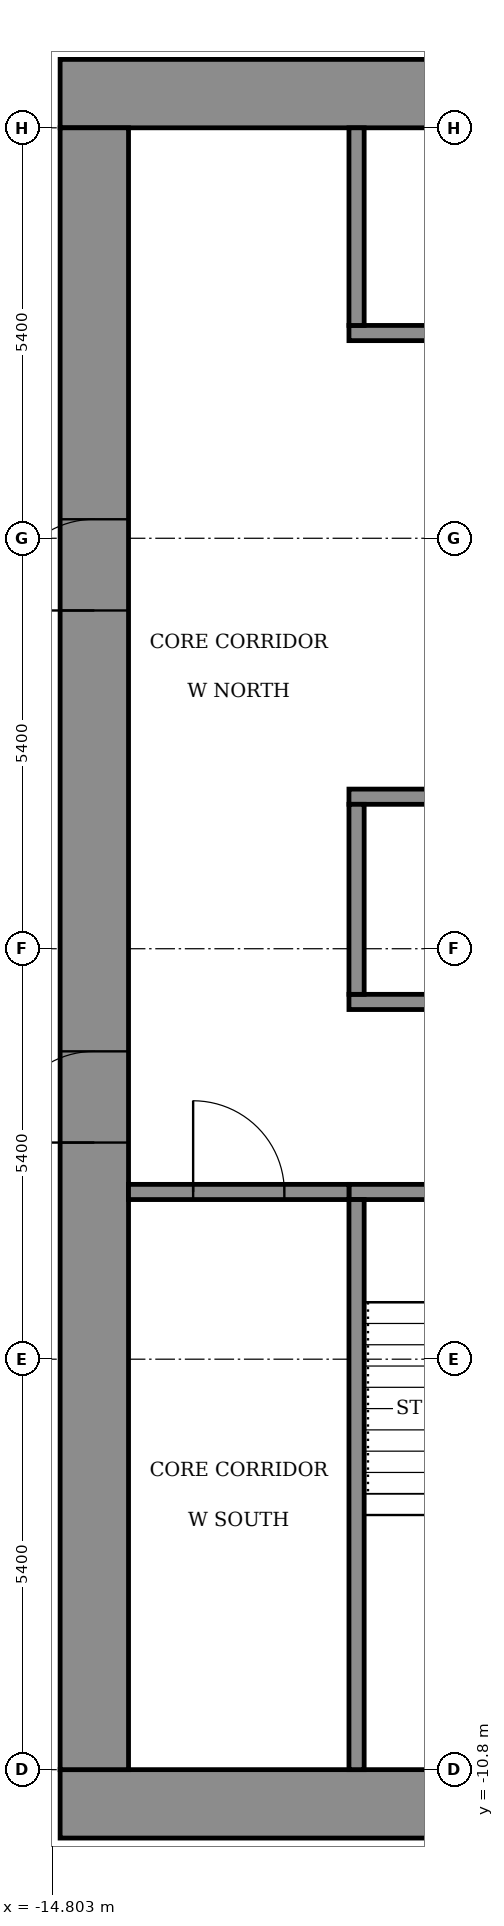
"""IFC4 building model, lengths in metres.
Left out: names, types, materials, properties, quantities, classifications, styles, units other than length and angle.
Written with IfcOpenShell. Run it as: python <this file> out.ifc"""

import sys

from ifc_helpers import new_model, si_unit, direction, frame, frame_2d, origin, place, context, subcontext, project, spatial, rectangle, extrude, element, fill, save


model = new_model("IFC4")
c1 = context("Model", 3, precision=1e-05, world=origin(), true_north=direction((0.0, 1.0)))
c2 = subcontext(c1, "Body", "Model", "MODEL_VIEW")
j1 = project(units=[si_unit("LENGTHUNIT", "METRE"), si_unit("PLANEANGLEUNIT", "RADIAN")], contexts=[c1])
p1 = place(None, origin())
s1 = spatial("IfcSite", under=j1, at=p1, CompositionType="ELEMENT")
p2 = place(p1, origin())
s2 = spatial("IfcBuilding", under=s1, at=p2, CompositionType="ELEMENT")
p3 = place(p2, frame((0.0, 0.0, 152.7)))
s3 = spatial("IfcBuildingStorey", under=s2, at=p3, CompositionType="ELEMENT", Elevation=152.7)
for number, where, z_axis, x_axis in (
    (1, (-14.7, -11.25, 0.0), (0.0, 0.0, 1.0), (1.0, 0.0, 0.0)),
    (2, (-14.7, 11.25, 0.0), (0.0, 0.0, 1.0), (1.0, 0.0, 0.0)),
):
    element("IfcWall", number, at=place(p3, frame(where, z_axis=z_axis, x_axis=x_axis)), inside=s3, PredefinedType="SHEAR", context=c2, shape_type="SweptSolid", body=[
        extrude(rectangle(XDim=29.4, YDim=0.9, at=frame_2d((14.7, 0.0))), origin(), (0.0, 0.0, 1.0), 3.6),
    ])
p4 = place(p3, frame((-14.25, -10.8, 0.0), z_axis=(0.0, 0.0, 1.0), x_axis=(0.0, 1.0, 0.0)))
e3 = element("IfcWall", 3, at=p4, inside=s3, PredefinedType="SHEAR", context=c2, shape_type="SweptSolid", body=[
    extrude(rectangle(XDim=21.6, YDim=0.9, at=frame_2d((10.8, 0.0))), origin(), (0.0, 0.0, 1.0), 3.6),
])
p5 = place(p4, frame((8.25, 0.0, 0.0)))
e4 = element("IfcOpeningElement", 4, at=p5, cuts=e3, PredefinedType="OPENING", context=c2, shape_type="SweptSolid", body=[
    extrude(rectangle(XDim=1.2, YDim=2.1, at=frame_2d((0.6, 1.05))), frame((0.0, 0.46, 0.0), z_axis=(0.0, -1.0, 0.0), x_axis=(1.0, 0.0, 0.0)), (0.0, 0.0, 1.0), 0.92),
])
p6 = place(p4, frame((15.25, 0.0, 0.0)))
e5 = element("IfcOpeningElement", 5, at=p6, cuts=e3, PredefinedType="OPENING", context=c2, shape_type="SweptSolid", body=[
    extrude(rectangle(XDim=1.2, YDim=2.1, at=frame_2d((0.6, 1.05))), frame((0.0, 0.46, 0.0), z_axis=(0.0, -1.0, 0.0), x_axis=(1.0, 0.0, 0.0)), (0.0, 0.0, 1.0), 0.92),
])
p7 = place(p3, frame((-10.9, -3.2, 0.0), z_axis=(0.0, 0.0, 1.0), x_axis=(1.0, 0.0, 0.0)))
e6 = element("IfcWall", 6, at=p7, inside=s3, PredefinedType="SHEAR", context=c2, shape_type="SweptSolid", body=[
    extrude(rectangle(XDim=21.8, YDim=0.2, at=frame_2d((10.9, 0.0))), origin(), (0.0, 0.0, 1.0), 3.05),
])
p8 = place(p7, frame((1.075, 0.0, 0.0)))
e7 = element("IfcOpeningElement", 7, at=p8, cuts=e6, PredefinedType="OPENING", context=c2, shape_type="SweptSolid", body=[
    extrude(rectangle(XDim=1.1, YDim=2.1, at=frame_2d((0.55, 1.05))), frame((0.0, 0.11, 0.0), z_axis=(0.0, -1.0, 0.0), x_axis=(1.0, 0.0, 0.0)), (0.0, 0.0, 1.0), 0.22),
])
p9 = place(p7, frame((10.325, 0.0, 0.0)))
e8 = element("IfcOpeningElement", 8, at=p9, cuts=e6, PredefinedType="OPENING", context=c2, shape_type="SweptSolid", body=[
    extrude(rectangle(XDim=1.1, YDim=2.1, at=frame_2d((0.55, 1.05))), frame((0.0, 0.11, 0.0), z_axis=(0.0, -1.0, 0.0), x_axis=(1.0, 0.0, 0.0)), (0.0, 0.0, 1.0), 0.22),
])
p10 = place(p7, frame((19.625, 0.0, 0.0)))
e9 = element("IfcOpeningElement", 9, at=p10, cuts=e6, PredefinedType="OPENING", context=c2, shape_type="SweptSolid", body=[
    extrude(rectangle(XDim=1.1, YDim=2.1, at=frame_2d((0.55, 1.05))), frame((0.0, 0.11, 0.0), z_axis=(0.0, -1.0, 0.0), x_axis=(1.0, 0.0, 0.0)), (0.0, 0.0, 1.0), 0.22),
])
p11 = place(p7, frame((5.7, 0.0, 0.0)))
e10 = element("IfcOpeningElement", 10, at=p11, cuts=e6, PredefinedType="OPENING", context=c2, shape_type="SweptSolid", body=[
    extrude(rectangle(XDim=1.1, YDim=2.1, at=frame_2d((0.55, 1.05))), frame((0.0, 0.11, 0.0), z_axis=(0.0, -1.0, 0.0), x_axis=(1.0, 0.0, 0.0)), (0.0, 0.0, 1.0), 0.22),
])
p12 = place(p7, frame((14.975, 0.0, 0.0)))
e11 = element("IfcOpeningElement", 11, at=p12, cuts=e6, PredefinedType="OPENING", context=c2, shape_type="SweptSolid", body=[
    extrude(rectangle(XDim=1.1, YDim=2.1, at=frame_2d((0.55, 1.05))), frame((0.0, 0.11, 0.0), z_axis=(0.0, -1.0, 0.0), x_axis=(1.0, 0.0, 0.0)), (0.0, 0.0, 1.0), 0.22),
])
p13 = place(p3, frame((-10.9, -0.7, 0.0), z_axis=(0.0, 0.0, 1.0), x_axis=(1.0, 0.0, 0.0)))
e12 = element("IfcWall", 12, at=p13, inside=s3, PredefinedType="SHEAR", context=c2, shape_type="SweptSolid", body=[
    extrude(rectangle(XDim=21.8, YDim=0.2, at=frame_2d((10.9, 0.0))), origin(), (0.0, 0.0, 1.0), 3.05),
])
p14 = place(p3, frame((-10.9, 2.0, 0.0), z_axis=(0.0, 0.0, 1.0), x_axis=(1.0, 0.0, 0.0)))
e13 = element("IfcWall", 13, at=p14, inside=s3, PredefinedType="SHEAR", context=c2, shape_type="SweptSolid", body=[
    extrude(rectangle(XDim=21.8, YDim=0.2, at=frame_2d((10.9, 0.0))), origin(), (0.0, 0.0, 1.0), 3.05),
])
p15 = place(p14, frame((14.4, 0.0, 0.0)))
e14 = element("IfcOpeningElement", 14, at=p15, cuts=e13, PredefinedType="OPENING", context=c2, shape_type="SweptSolid", body=[
    extrude(rectangle(XDim=1.1, YDim=2.1, at=frame_2d((0.55, 1.05))), frame((0.0, 0.11, 0.0), z_axis=(0.0, -1.0, 0.0), x_axis=(1.0, 0.0, 0.0)), (0.0, 0.0, 1.0), 0.22),
])
p16 = place(p14, frame((17.1, 0.0, 0.0)))
e15 = element("IfcOpeningElement", 15, at=p16, cuts=e13, PredefinedType="OPENING", context=c2, shape_type="SweptSolid", body=[
    extrude(rectangle(XDim=1.1, YDim=2.1, at=frame_2d((0.55, 1.05))), frame((0.0, 0.11, 0.0), z_axis=(0.0, -1.0, 0.0), x_axis=(1.0, 0.0, 0.0)), (0.0, 0.0, 1.0), 0.22),
])
p17 = place(p14, frame((19.8, 0.0, 0.0)))
e16 = element("IfcOpeningElement", 16, at=p17, cuts=e13, PredefinedType="OPENING", context=c2, shape_type="SweptSolid", body=[
    extrude(rectangle(XDim=1.1, YDim=2.1, at=frame_2d((0.55, 1.05))), frame((0.0, 0.11, 0.0), z_axis=(0.0, -1.0, 0.0), x_axis=(1.0, 0.0, 0.0)), (0.0, 0.0, 1.0), 0.22),
])
p18 = place(p14, frame((3.025, 0.0, 0.0)))
e17 = element("IfcOpeningElement", 17, at=p18, cuts=e13, PredefinedType="OPENING", context=c2, shape_type="SweptSolid", body=[
    extrude(rectangle(XDim=0.9, YDim=2.1, at=frame_2d((0.45, 1.05))), frame((0.0, 0.11, 0.0), z_axis=(0.0, -1.0, 0.0), x_axis=(1.0, 0.0, 0.0)), (0.0, 0.0, 1.0), 0.22),
])
p19 = place(p14, frame((9.775, 0.0, 0.0)))
e18 = element("IfcOpeningElement", 18, at=p19, cuts=e13, PredefinedType="OPENING", context=c2, shape_type="SweptSolid", body=[
    extrude(rectangle(XDim=0.9, YDim=2.1, at=frame_2d((0.45, 1.05))), frame((0.0, 0.11, 0.0), z_axis=(0.0, -1.0, 0.0), x_axis=(1.0, 0.0, 0.0)), (0.0, 0.0, 1.0), 0.22),
])
p20 = place(p3, frame((-10.9, 8.1, 0.0), z_axis=(0.0, 0.0, 1.0), x_axis=(1.0, 0.0, 0.0)))
e19 = element("IfcWall", 19, at=p20, inside=s3, PredefinedType="SHEAR", context=c2, shape_type="SweptSolid", body=[
    extrude(rectangle(XDim=21.8, YDim=0.2, at=frame_2d((10.9, 0.0))), origin(), (0.0, 0.0, 1.0), 3.05),
])
p21 = place(p20, frame((14.4, 0.0, 0.0)))
e20 = element("IfcOpeningElement", 20, at=p21, cuts=e19, PredefinedType="OPENING", context=c2, shape_type="SweptSolid", body=[
    extrude(rectangle(XDim=1.1, YDim=2.1, at=frame_2d((0.55, 1.05))), frame((0.0, 0.11, 0.0), z_axis=(0.0, -1.0, 0.0), x_axis=(1.0, 0.0, 0.0)), (0.0, 0.0, 1.0), 0.22),
])
p22 = place(p20, frame((17.1, 0.0, 0.0)))
e21 = element("IfcOpeningElement", 21, at=p22, cuts=e19, PredefinedType="OPENING", context=c2, shape_type="SweptSolid", body=[
    extrude(rectangle(XDim=1.1, YDim=2.1, at=frame_2d((0.55, 1.05))), frame((0.0, 0.11, 0.0), z_axis=(0.0, -1.0, 0.0), x_axis=(1.0, 0.0, 0.0)), (0.0, 0.0, 1.0), 0.22),
])
p23 = place(p20, frame((19.8, 0.0, 0.0)))
e22 = element("IfcOpeningElement", 22, at=p23, cuts=e19, PredefinedType="OPENING", context=c2, shape_type="SweptSolid", body=[
    extrude(rectangle(XDim=1.1, YDim=2.1, at=frame_2d((0.55, 1.05))), frame((0.0, 0.11, 0.0), z_axis=(0.0, -1.0, 0.0), x_axis=(1.0, 0.0, 0.0)), (0.0, 0.0, 1.0), 0.22),
])
p24 = place(p20, frame((6.4, 0.0, 0.0)))
e23 = element("IfcOpeningElement", 23, at=p24, cuts=e19, PredefinedType="OPENING", context=c2, shape_type="SweptSolid", body=[
    extrude(rectangle(XDim=0.9, YDim=2.1, at=frame_2d((0.45, 1.05))), frame((0.0, 0.11, 0.0), z_axis=(0.0, -1.0, 0.0), x_axis=(1.0, 0.0, 0.0)), (0.0, 0.0, 1.0), 0.22),
])
p25 = place(p3, frame((-10.8, -10.8, 0.0), z_axis=(0.0, 0.0, 1.0), x_axis=(0.0, 1.0, 0.0)))
e24 = element("IfcWall", 24, at=p25, inside=s3, PredefinedType="SHEAR", context=c2, shape_type="SweptSolid", body=[
    extrude(rectangle(XDim=7.5, YDim=0.2, at=frame_2d((3.75, 0.0))), origin(), (0.0, 0.0, 1.0), 3.05),
])
p26 = place(p3, frame((-10.8, -0.6, 0.0), z_axis=(0.0, 0.0, 1.0), x_axis=(0.0, 1.0, 0.0)))
e25 = element("IfcWall", 25, at=p26, inside=s3, PredefinedType="STANDARD", context=c2, shape_type="SweptSolid", body=[
    extrude(rectangle(XDim=2.5, YDim=0.2, at=frame_2d((1.25, 0.0))), origin(), (0.0, 0.0, 1.0), 3.05),
])
p27 = place(p3, frame((-10.8, 8.2, 0.0), z_axis=(0.0, 0.0, 1.0), x_axis=(0.0, 1.0, 0.0)))
e26 = element("IfcWall", 26, at=p27, inside=s3, PredefinedType="STANDARD", context=c2, shape_type="SweptSolid", body=[
    extrude(rectangle(XDim=2.6, YDim=0.2, at=frame_2d((1.3, 0.0))), origin(), (0.0, 0.0, 1.0), 3.05),
])
p28 = place(p3, frame((-13.8, -3.2, 0.0), z_axis=(0.0, 0.0, 1.0), x_axis=(1.0, 0.0, 0.0)))
e27 = element("IfcWall", 27, at=p28, inside=s3, PredefinedType="STANDARD", context=c2, shape_type="SweptSolid", body=[
    extrude(rectangle(XDim=2.9, YDim=0.2, at=frame_2d((1.45, 0.0))), origin(), (0.0, 0.0, 1.0), 3.05),
])
p29 = place(p28, frame((0.85, 0.0, 0.0)))
e28 = element("IfcOpeningElement", 28, at=p29, cuts=e27, PredefinedType="OPENING", context=c2, shape_type="SweptSolid", body=[
    extrude(rectangle(XDim=1.2, YDim=2.1, at=frame_2d((0.6, 1.05))), frame((0.0, 0.11, 0.0), z_axis=(0.0, -1.0, 0.0), x_axis=(1.0, 0.0, 0.0)), (0.0, 0.0, 1.0), 0.22),
])
p30 = place(p5, origin())
e29 = element("IfcDoor", 29, at=p30, inside=s3, OperationType="DOUBLE_DOOR_SINGLE_SWING", PredefinedType="DOOR", context=c2, shape_type="SweptSolid", body=[
    extrude(rectangle(XDim=1.2, YDim=2.1, at=frame_2d((0.6, 1.05))), frame((0.0, 0.025, 0.0), z_axis=(0.0, -1.0, 0.0), x_axis=(1.0, 0.0, 0.0)), (0.0, 0.0, 1.0), 0.05),
])
fill(e4, e29)
p31 = place(p6, origin())
e30 = element("IfcDoor", 30, at=p31, inside=s3, OperationType="DOUBLE_DOOR_SINGLE_SWING", PredefinedType="DOOR", context=c2, shape_type="SweptSolid", body=[
    extrude(rectangle(XDim=1.2, YDim=2.1, at=frame_2d((0.6, 1.05))), frame((0.0, 0.025, 0.0), z_axis=(0.0, -1.0, 0.0), x_axis=(1.0, 0.0, 0.0)), (0.0, 0.0, 1.0), 0.05),
])
fill(e5, e30)
p32 = place(p29, origin())
e31 = element("IfcDoor", 31, at=p32, inside=s3, OperationType="SINGLE_SWING_LEFT", PredefinedType="DOOR", context=c2, shape_type="SweptSolid", body=[
    extrude(rectangle(XDim=1.2, YDim=2.1, at=frame_2d((0.6, 1.05))), frame((0.0, 0.025, 0.0), z_axis=(0.0, -1.0, 0.0), x_axis=(1.0, 0.0, 0.0)), (0.0, 0.0, 1.0), 0.05),
])
fill(e28, e31)
save(model, sys.argv[1])
